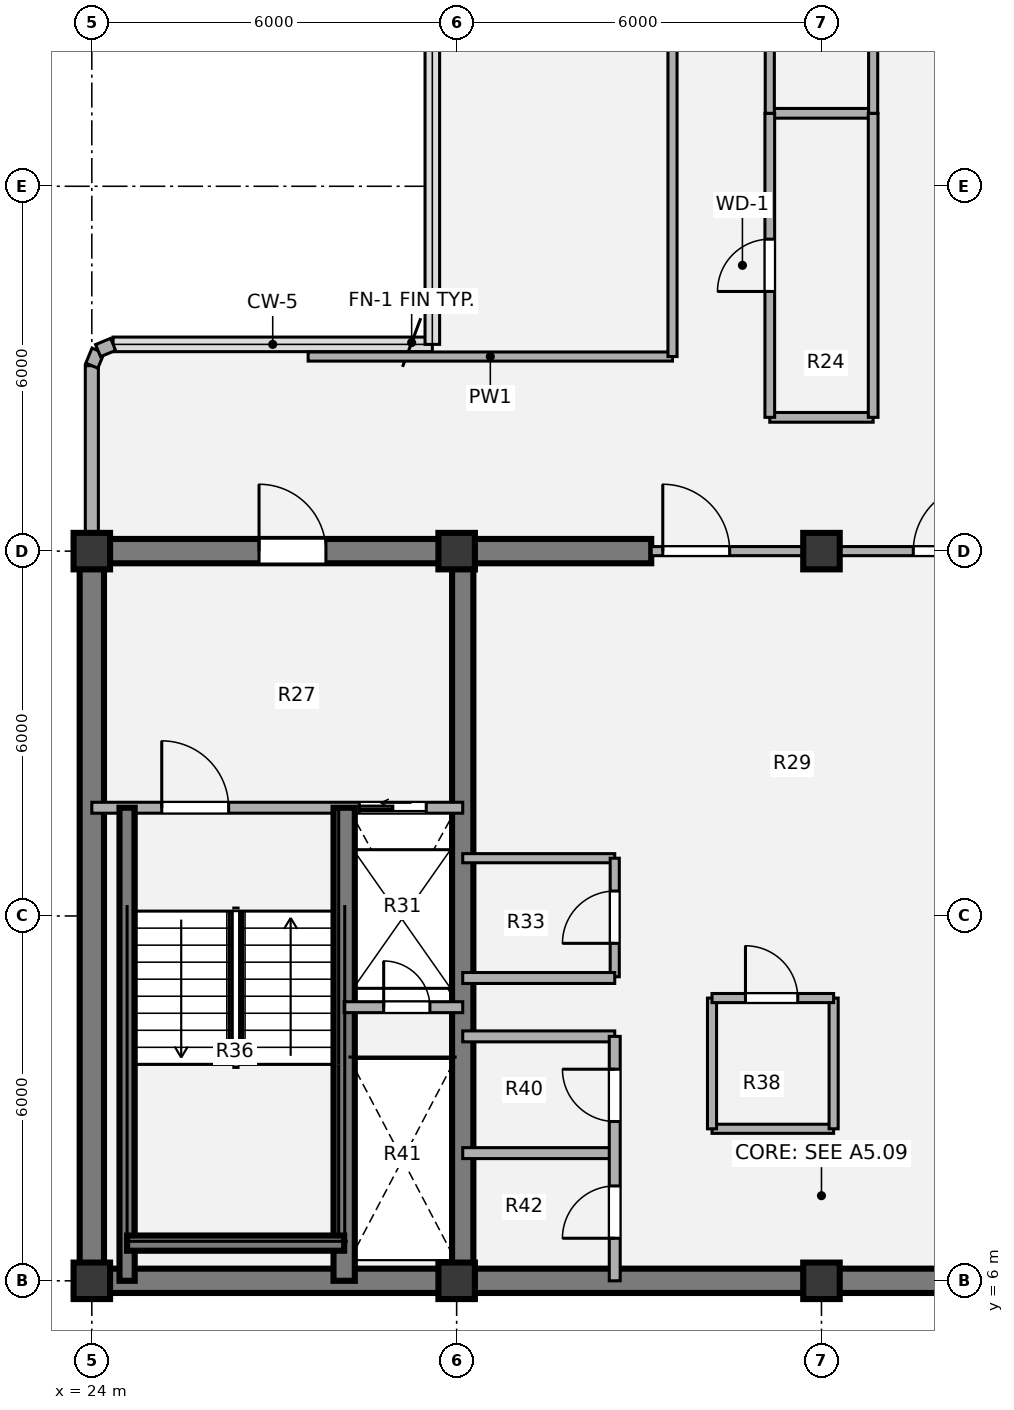
"""IFC4 building model, lengths in metres.
Left out: names, types, materials, properties, quantities, classifications, styles, units other than length and angle.
Written with IfcOpenShell. Run it as: python <this file> out.ifc"""

import sys

from ifc_helpers import new_model, si_unit, direction, frame, frame_2d, origin, origin_2d, place, context, subcontext, project, spatial, rectangle, extrude, source, transform, mapped, element, fill, save


model = new_model("IFC4")
c1 = context("Model", 3, precision=1e-05, world=origin(), true_north=direction((0.0, 1.0)))
c2 = subcontext(c1, "Body", "Model", "MODEL_VIEW")
j1 = project(units=[si_unit("LENGTHUNIT", "METRE"), si_unit("PLANEANGLEUNIT", "RADIAN")], contexts=[c1])
p1 = place(None, origin())
s1 = spatial("IfcSite", under=j1, at=p1, CompositionType="ELEMENT")
p2 = place(p1, origin())
s2 = spatial("IfcBuilding", under=s1, at=p2, CompositionType="ELEMENT")
p3 = place(p2, frame((0.0, 0.0, 223.02)))
s3 = spatial("IfcBuildingStorey", under=s2, at=p3, CompositionType="ELEMENT", Elevation=223.02)
m1 = source(origin(), c2, "Body", "SweptSolid", [
    extrude(rectangle(XDim=0.6, YDim=0.6, at=origin_2d()), origin(), (0.0, 0.0, 1.0), 3.78),
])
for number, where, z_axis, x_axis in (
    (1, (24.0, 6.0, 0.0), (0.0, 0.0, 1.0), (1.0, 0.0, 0.0)),
    (2, (30.0, 6.0, 0.0), (0.0, 0.0, 1.0), (1.0, 0.0, 0.0)),
    (3, (36.0, 6.0, 0.0), (0.0, 0.0, 1.0), (1.0, 0.0, 0.0)),
    (4, (24.0, 18.0, 0.0), (0.0, 0.0, 1.0), (1.0, 0.0, 0.0)),
    (5, (30.0, 18.0, 0.0), (0.0, 0.0, 1.0), (1.0, 0.0, 0.0)),
    (6, (36.0, 18.0, 0.0), (0.0, 0.0, 1.0), (1.0, 0.0, 0.0)),
):
    element("IfcColumn", number, at=place(p3, frame(where, z_axis=z_axis, x_axis=x_axis)), inside=s3, PredefinedType="COLUMN", context=c2, shape_type="MappedRepresentation", body=[
        mapped(m1, transform((0.0, 0.0, 0.0), x_axis=(1.0, 0.0, 0.0), y_axis=(0.0, 1.0, 0.0), z_axis=(0.0, 0.0, 1.0), scale=1.0)),
    ])
p4 = place(p3, frame((48.2, 6.0, 0.0), z_axis=(0.0, 0.0, 1.0), x_axis=(-1.0, 0.0, 0.0)))
e7 = element("IfcWall", 7, at=p4, inside=s3, PredefinedType="SHEAR", context=c2, shape_type="SweptSolid", body=[
    extrude(rectangle(XDim=24.4, YDim=0.4, at=frame_2d((12.2, 0.0))), origin(), (0.0, 0.0, 1.0), 3.78),
])
p5 = place(p3, frame((24.0, 6.0, 0.0), z_axis=(0.0, 0.0, 1.0), x_axis=(0.0, 1.0, 0.0)))
e8 = element("IfcWall", 8, at=p5, inside=s3, PredefinedType="SHEAR", context=c2, shape_type="SweptSolid", body=[
    extrude(rectangle(XDim=12.0, YDim=0.4, at=frame_2d((6.0, 0.0))), origin(), (0.0, 0.0, 1.0), 3.78),
])
p6 = place(p3, frame((23.8, 18.0, 0.0), z_axis=(0.0, 0.0, 1.0), x_axis=(1.0, 0.0, 0.0)))
e9 = element("IfcWall", 9, at=p6, inside=s3, PredefinedType="SHEAR", context=c2, shape_type="SweptSolid", body=[
    extrude(rectangle(XDim=9.4, YDim=0.4, at=frame_2d((4.7, 0.0))), origin(), (0.0, 0.0, 1.0), 3.78),
])
p7 = place(p6, frame((2.95, 0.0, 0.0)))
e10 = element("IfcOpeningElement", 10, at=p7, cuts=e9, PredefinedType="OPENING", context=c2, shape_type="SweptSolid", body=[
    extrude(rectangle(XDim=1.1, YDim=2.1, at=origin_2d()), frame((0.55, 0.21, 1.05), z_axis=(0.0, -1.0, 0.0), x_axis=(1.0, 0.0, 0.0)), (0.0, 0.0, 1.0), 0.42),
])
p8 = place(p3, frame((30.1, 6.0, 0.0), z_axis=(0.0, 0.0, 1.0), x_axis=(0.0, 1.0, 0.0)))
e11 = element("IfcWall", 11, at=p8, inside=s3, PredefinedType="SHEAR", context=c2, shape_type="SweptSolid", body=[
    extrude(rectangle(XDim=12.0, YDim=0.35, at=frame_2d((6.0, 0.0))), origin(), (0.0, 0.0, 1.0), 3.78),
])
p9 = place(p3, frame((24.0, 18.28, 0.0), z_axis=(0.0, 0.0, 1.0), x_axis=(0.0, 1.0, 0.0)))
e12 = element("IfcWall", 12, at=p9, inside=s3, PredefinedType="SOLIDWALL", context=c2, shape_type="SweptSolid", body=[
    extrude(rectangle(XDim=2.77, YDim=0.215, at=frame_2d((1.385, 0.0))), origin(), (0.0, 0.0, 1.0), 2.718),
])
p10 = place(p3, frame((24.0, 21.05, 0.0), z_axis=(0.0, 0.0, 1.0), x_axis=(0.382673670509, 0.923883575944, 0.0)))
e13 = element("IfcWall", 13, at=p10, inside=s3, PredefinedType="SOLIDWALL", context=c2, shape_type="SweptSolid", body=[
    extrude(rectangle(XDim=0.268, YDim=0.215, at=frame_2d((0.134, 0.0))), origin(), (0.0, 0.0, 1.0), 3.53),
])
p11 = place(p3, frame((24.103, 21.298, 0.0), z_axis=(0.0, 0.0, 1.0), x_axis=(0.924205486139, 0.381895560841, 0.0)))
e14 = element("IfcWall", 14, at=p11, inside=s3, PredefinedType="SOLIDWALL", context=c2, shape_type="SweptSolid", body=[
    extrude(rectangle(XDim=0.268, YDim=0.215, at=frame_2d((0.134, 0.0))), origin(), (0.0, 0.0, 1.0), 3.53),
])
p12 = place(p3, frame((30.1, 12.95, 0.0), z_axis=(0.0, 0.0, 1.0), x_axis=(1.0, 0.0, 0.0)))
e15 = element("IfcWall", 15, at=p12, inside=s3, PredefinedType="PARTITIONING", context=c2, shape_type="SweptSolid", body=[
    extrude(rectangle(XDim=2.5, YDim=0.15, at=frame_2d((1.25, 0.0))), origin(), (0.0, 0.0, 1.0), 3.5),
])
p13 = place(p3, frame((32.6, 11.0, 0.0), z_axis=(0.0, 0.0, 1.0), x_axis=(0.0, 1.0, 0.0)))
e16 = element("IfcWall", 16, at=p13, inside=s3, PredefinedType="PARTITIONING", context=c2, shape_type="SweptSolid", body=[
    extrude(rectangle(XDim=1.95, YDim=0.15, at=frame_2d((0.975, 0.0))), origin(), (0.0, 0.0, 1.0), 3.5),
])
p14 = place(p13, frame((0.55, 0.0, 0.0)))
e17 = element("IfcOpeningElement", 17, at=p14, cuts=e16, PredefinedType="OPENING", context=c2, shape_type="SweptSolid", body=[
    extrude(rectangle(XDim=0.86, YDim=2.1, at=origin_2d()), frame((0.43, 0.085, 1.05), z_axis=(0.0, -1.0, 0.0), x_axis=(1.0, 0.0, 0.0)), (0.0, 0.0, 1.0), 0.17),
])
p15 = place(p3, frame((34.2, 8.5, 0.0), z_axis=(0.0, 0.0, 1.0), x_axis=(1.0, 0.0, 0.0)))
e18 = element("IfcWall", 18, at=p15, inside=s3, PredefinedType="PARTITIONING", context=c2, shape_type="SweptSolid", body=[
    extrude(rectangle(XDim=2.0, YDim=0.15, at=frame_2d((1.0, 0.0))), origin(), (0.0, 0.0, 1.0), 3.5),
])
p16 = place(p3, frame((34.2, 8.5, 0.0), z_axis=(0.0, 0.0, 1.0), x_axis=(0.0, 1.0, 0.0)))
e19 = element("IfcWall", 19, at=p16, inside=s3, PredefinedType="PARTITIONING", context=c2, shape_type="SweptSolid", body=[
    extrude(rectangle(XDim=2.15, YDim=0.15, at=frame_2d((1.075, 0.0))), origin(), (0.0, 0.0, 1.0), 3.5),
])
p17 = place(p3, frame((36.2, 8.5, 0.0), z_axis=(0.0, 0.0, 1.0), x_axis=(0.0, 1.0, 0.0)))
e20 = element("IfcWall", 20, at=p17, inside=s3, PredefinedType="PARTITIONING", context=c2, shape_type="SweptSolid", body=[
    extrude(rectangle(XDim=2.15, YDim=0.15, at=frame_2d((1.075, 0.0))), origin(), (0.0, 0.0, 1.0), 2.715),
])
p18 = place(p3, frame((34.2, 10.65, 0.0), z_axis=(0.0, 0.0, 1.0), x_axis=(1.0, 0.0, 0.0)))
e21 = element("IfcWall", 21, at=p18, inside=s3, PredefinedType="PARTITIONING", context=c2, shape_type="SweptSolid", body=[
    extrude(rectangle(XDim=2.0, YDim=0.15, at=frame_2d((1.0, 0.0))), origin(), (0.0, 0.0, 1.0), 3.5),
])
p19 = place(p18, frame((0.55, 0.0, 0.0)))
e22 = element("IfcOpeningElement", 22, at=p19, cuts=e21, PredefinedType="OPENING", context=c2, shape_type="SweptSolid", body=[
    extrude(rectangle(XDim=0.86, YDim=2.1, at=origin_2d()), frame((0.43, 0.085, 1.05), z_axis=(0.0, -1.0, 0.0), x_axis=(1.0, 0.0, 0.0)), (0.0, 0.0, 1.0), 0.17),
])
for number, where, z_axis, x_axis in (
    (23, (30.1, 10.98, 0.0), (0.0, 0.0, 1.0), (1.0, 0.0, 0.0)),
    (24, (30.1, 8.1, 0.0), (0.0, 0.0, 1.0), (1.0, 0.0, 0.0)),
    (25, (30.1, 10.02, 0.0), (0.0, 0.0, 1.0), (1.0, 0.0, 0.0)),
):
    element("IfcWall", number, at=place(p3, frame(where, z_axis=z_axis, x_axis=x_axis)), inside=s3, PredefinedType="PARTITIONING", context=c2, shape_type="SweptSolid", body=[
        extrude(rectangle(XDim=2.5, YDim=0.18, at=frame_2d((1.25, 0.0))), origin(), (0.0, 0.0, 1.0), 3.5),
    ])
p20 = place(p3, frame((32.6, 6.0, 0.0), z_axis=(0.0, 0.0, 1.0), x_axis=(0.0, 1.0, 0.0)))
e26 = element("IfcWall", 26, at=p20, inside=s3, PredefinedType="PARTITIONING", context=c2, shape_type="SweptSolid", body=[
    extrude(rectangle(XDim=4.02, YDim=0.18, at=frame_2d((2.01, 0.0))), origin(), (0.0, 0.0, 1.0), 3.5),
])
p21 = place(p20, frame((0.7, 0.0, 0.0)))
e27 = element("IfcOpeningElement", 27, at=p21, cuts=e26, PredefinedType="OPENING", context=c2, shape_type="SweptSolid", body=[
    extrude(rectangle(XDim=0.86, YDim=2.1, at=origin_2d()), frame((0.43, 0.1, 1.05), z_axis=(0.0, -1.0, 0.0), x_axis=(1.0, 0.0, 0.0)), (0.0, 0.0, 1.0), 0.2),
])
p22 = place(p20, frame((2.62, 0.0, 0.0)))
e28 = element("IfcOpeningElement", 28, at=p22, cuts=e26, PredefinedType="OPENING", context=c2, shape_type="SweptSolid", body=[
    extrude(rectangle(XDim=0.86, YDim=2.1, at=origin_2d()), frame((0.43, 0.1, 1.05), z_axis=(0.0, -1.0, 0.0), x_axis=(1.0, 0.0, 0.0)), (0.0, 0.0, 1.0), 0.2),
])
p23 = place(p3, frame((33.2, 18.0, 0.0), z_axis=(0.0, 0.0, 1.0), x_axis=(1.0, 0.0, 0.0)))
e29 = element("IfcWall", 29, at=p23, inside=s3, PredefinedType="PARTITIONING", context=c2, shape_type="SweptSolid", body=[
    extrude(rectangle(XDim=5.6, YDim=0.15, at=frame_2d((2.8, 0.0))), origin(), (0.0, 0.0, 1.0), 2.515),
])
p24 = place(p23, frame((0.19, 0.0, 0.0)))
e30 = element("IfcOpeningElement", 30, at=p24, cuts=e29, PredefinedType="OPENING", context=c2, shape_type="SweptSolid", body=[
    extrude(rectangle(XDim=1.1, YDim=2.1, at=origin_2d()), frame((0.55, 0.085, 1.05), z_axis=(0.0, -1.0, 0.0), x_axis=(1.0, 0.0, 0.0)), (0.0, 0.0, 1.0), 0.17),
])
p25 = place(p23, frame((4.31, 0.0, 0.0)))
e31 = element("IfcOpeningElement", 31, at=p25, cuts=e29, PredefinedType="OPENING", context=c2, shape_type="SweptSolid", body=[
    extrude(rectangle(XDim=1.1, YDim=2.1, at=origin_2d()), frame((0.55, 0.085, 1.05), z_axis=(0.0, -1.0, 0.0), x_axis=(1.0, 0.0, 0.0)), (0.0, 0.0, 1.0), 0.17),
])
p26 = place(p3, frame((24.0, 13.78, 0.0), z_axis=(0.0, 0.0, 1.0), x_axis=(1.0, 0.0, 0.0)))
e32 = element("IfcWall", 32, at=p26, inside=s3, PredefinedType="PARTITIONING", context=c2, shape_type="SweptSolid", body=[
    extrude(rectangle(XDim=6.1, YDim=0.18, at=frame_2d((3.05, 0.0))), origin(), (0.0, 0.0, 1.0), 3.5),
])
p27 = place(p26, frame((1.15, 0.0, 0.0)))
e33 = element("IfcOpeningElement", 33, at=p27, cuts=e32, PredefinedType="OPENING", context=c2, shape_type="SweptSolid", body=[
    extrude(rectangle(XDim=1.1, YDim=2.1, at=origin_2d()), frame((0.55, 0.1, 1.05), z_axis=(0.0, -1.0, 0.0), x_axis=(1.0, 0.0, 0.0)), (0.0, 0.0, 1.0), 0.2),
])
p28 = place(p26, frame((4.4, 0.0, 0.0)))
e34 = element("IfcOpeningElement", 34, at=p28, cuts=e32, PredefinedType="OPENING", context=c2, shape_type="SweptSolid", body=[
    extrude(rectangle(XDim=1.1, YDim=2.1, at=origin_2d()), frame((0.55, 0.1, 1.05), z_axis=(0.0, -1.0, 0.0), x_axis=(1.0, 0.0, 0.0)), (0.0, 0.0, 1.0), 0.2),
])
p29 = place(p3, frame((28.15, 6.0, 0.0), z_axis=(0.0, 0.0, 1.0), x_axis=(0.0, 1.0, 0.0)))
e35 = element("IfcWall", 35, at=p29, inside=s3, PredefinedType="SHEAR", context=c2, shape_type="SweptSolid", body=[
    extrude(rectangle(XDim=7.78, YDim=0.35, at=frame_2d((3.89, 0.0))), origin(), (0.0, 0.0, 1.0), 3.85),
])
p30 = place(p3, frame((24.58, 6.0, 0.0), z_axis=(0.0, 0.0, 1.0), x_axis=(0.0, 1.0, 0.0)))
e36 = element("IfcWall", 36, at=p30, inside=s3, PredefinedType="SHEAR", context=c2, shape_type="SweptSolid", body=[
    extrude(rectangle(XDim=7.78, YDim=0.25, at=frame_2d((3.89, 0.0))), origin(), (0.0, 0.0, 1.0), 3.85),
])
p31 = place(p3, frame((24.58, 6.62, 0.0), z_axis=(0.0, 0.0, 1.0), x_axis=(1.0, 0.0, 0.0)))
e37 = element("IfcWall", 37, at=p31, inside=s3, PredefinedType="SHEAR", context=c2, shape_type="SweptSolid", body=[
    extrude(rectangle(XDim=3.57, YDim=0.25, at=frame_2d((1.785, 0.0))), origin(), (0.0, 0.0, 1.0), 3.85),
])
p32 = place(p3, frame((28.15, 10.5, 0.0), z_axis=(0.0, 0.0, 1.0), x_axis=(1.0, 0.0, 0.0)))
e38 = element("IfcWall", 38, at=p32, inside=s3, PredefinedType="PARTITIONING", context=c2, shape_type="SweptSolid", body=[
    extrude(rectangle(XDim=1.95, YDim=0.18, at=frame_2d((0.975, 0.0))), origin(), (0.0, 0.0, 1.0), 3.5),
])
p33 = place(p32, frame((0.65, 0.0, 0.0)))
e39 = element("IfcOpeningElement", 39, at=p33, cuts=e38, PredefinedType="OPENING", context=c2, shape_type="SweptSolid", body=[
    extrude(rectangle(XDim=0.76, YDim=2.05, at=origin_2d()), frame((0.38, 0.1, 1.025), z_axis=(0.0, -1.0, 0.0), x_axis=(1.0, 0.0, 0.0)), (0.0, 0.0, 1.0), 0.2),
])
p34 = place(p3, frame((35.15, 20.2, 0.0), z_axis=(0.0, 0.0, 1.0), x_axis=(1.0, 0.0, 0.0)))
e40 = element("IfcWall", 40, at=p34, inside=s3, PredefinedType="PLUMBINGWALL", context=c2, shape_type="SweptSolid", body=[
    extrude(rectangle(XDim=1.7, YDim=0.16, at=frame_2d((0.85, 0.0))), origin(), (0.0, 0.0, 1.0), 3.5),
])
p35 = place(p3, frame((27.558, 21.2, 0.0), z_axis=(0.0, 0.0, 1.0), x_axis=(1.0, 0.0, 0.0)))
e41 = element("IfcWall", 41, at=p35, inside=s3, PredefinedType="PARTITIONING", context=c2, shape_type="SweptSolid", body=[
    extrude(rectangle(XDim=5.992, YDim=0.15, at=frame_2d((2.996, 0.0))), origin(), (0.0, 0.0, 1.0), 3.5),
])
p36 = place(p3, frame((35.15, 25.2, 0.0), z_axis=(0.0, 0.0, 1.0), x_axis=(1.0, 0.0, 0.0)))
e42 = element("IfcWall", 42, at=p36, inside=s3, PredefinedType="PLUMBINGWALL", context=c2, shape_type="SweptSolid", body=[
    extrude(rectangle(XDim=1.7, YDim=0.16, at=frame_2d((0.85, 0.0))), origin(), (0.0, 0.0, 1.0), 3.5),
])
p37 = place(p3, frame((33.55, 21.2, 0.0), z_axis=(0.0, 0.0, 1.0), x_axis=(0.0, 1.0, 0.0)))
e43 = element("IfcWall", 43, at=p37, inside=s3, PredefinedType="PARTITIONING", context=c2, shape_type="SweptSolid", body=[
    extrude(rectangle(XDim=20.4, YDim=0.15, at=frame_2d((10.2, 0.0))), origin(), (0.0, 0.0, 1.0), 3.5),
])
p38 = place(p37, frame((9.64, 0.0, 0.0)))
e44 = element("IfcOpeningElement", 44, at=p38, cuts=e43, PredefinedType="OPENING", context=c2, shape_type="SweptSolid", body=[
    extrude(rectangle(XDim=0.86, YDim=2.1, at=origin_2d()), frame((0.43, 0.085, 1.05), z_axis=(0.0, -1.0, 0.0), x_axis=(1.0, 0.0, 0.0)), (0.0, 0.0, 1.0), 0.17),
])
p39 = place(p3, frame((35.15, 20.2, 0.0), z_axis=(0.0, 0.0, 1.0), x_axis=(0.0, 1.0, 0.0)))
e45 = element("IfcWall", 45, at=p39, inside=s3, PredefinedType="PLUMBINGWALL", context=c2, shape_type="SweptSolid", body=[
    extrude(rectangle(XDim=5.0, YDim=0.16, at=frame_2d((2.5, 0.0))), origin(), (0.0, 0.0, 1.0), 3.5),
])
p40 = place(p39, frame((2.07, 0.0, 0.0)))
e46 = element("IfcOpeningElement", 46, at=p40, cuts=e45, PredefinedType="OPENING", context=c2, shape_type="SweptSolid", body=[
    extrude(rectangle(XDim=0.86, YDim=2.1, at=origin_2d()), frame((0.43, 0.09, 1.05), z_axis=(0.0, -1.0, 0.0), x_axis=(1.0, 0.0, 0.0)), (0.0, 0.0, 1.0), 0.18),
])
p41 = place(p3, frame((35.15, 25.2, 0.0), z_axis=(0.0, 0.0, 1.0), x_axis=(0.0, 1.0, 0.0)))
e47 = element("IfcWall", 47, at=p41, inside=s3, PredefinedType="PARTITIONING", context=c2, shape_type="SweptSolid", body=[
    extrude(rectangle(XDim=19.42, YDim=0.15, at=frame_2d((9.71, 0.0))), origin(), (0.0, 0.0, 1.0), 3.5),
])
p42 = place(p3, frame((36.85, 20.2, 0.0), z_axis=(0.0, 0.0, 1.0), x_axis=(0.0, 1.0, 0.0)))
e48 = element("IfcWall", 48, at=p42, inside=s3, PredefinedType="PLUMBINGWALL", context=c2, shape_type="SweptSolid", body=[
    extrude(rectangle(XDim=5.0, YDim=0.16, at=frame_2d((2.5, 0.0))), origin(), (0.0, 0.0, 1.0), 3.5),
])
p43 = place(p3, frame((36.85, 25.2, 0.0), z_axis=(0.0, 0.0, 1.0), x_axis=(0.0, 1.0, 0.0)))
e49 = element("IfcWall", 49, at=p43, inside=s3, PredefinedType="PARTITIONING", context=c2, shape_type="SweptSolid", body=[
    extrude(rectangle(XDim=19.42, YDim=0.15, at=frame_2d((9.71, 0.0))), origin(), (0.0, 0.0, 1.0), 3.5),
])
p44 = place(p43, frame((9.185, 0.0, 0.0)))
e50 = element("IfcOpeningElement", 50, at=p44, cuts=e49, PredefinedType="OPENING", context=c2, shape_type="SweptSolid", body=[
    extrude(rectangle(XDim=1.05, YDim=2.1, at=origin_2d()), frame((0.525, 0.085, 1.05), z_axis=(0.0, -1.0, 0.0), x_axis=(1.0, 0.0, 0.0)), (0.0, 0.0, 1.0), 0.17),
])
m2 = source(origin(), c2, "Body", "SweptSolid", [
    extrude(rectangle(XDim=0.86, YDim=2.1, at=origin_2d()), frame((0.43, 0.025, 1.05), z_axis=(0.0, -1.0, 0.0), x_axis=(1.0, 0.0, 0.0)), (0.0, 0.0, 1.0), 0.05),
])
p45 = place(p14, origin())
e51 = element("IfcDoor", 51, at=p45, inside=s3, OperationType="SINGLE_SWING_LEFT", PredefinedType="DOOR", context=c2, shape_type="MappedRepresentation", body=[
    mapped(m2, transform((0.0, 0.0, 0.0), x_axis=(1.0, 0.0, 0.0), y_axis=(0.0, 1.0, 0.0), z_axis=(0.0, 0.0, 1.0), scale=1.0)),
])
fill(e17, e51)
p46 = place(p19, origin())
e52 = element("IfcDoor", 52, at=p46, inside=s3, OperationType="SINGLE_SWING_LEFT", PredefinedType="DOOR", context=c2, shape_type="MappedRepresentation", body=[
    mapped(m2, transform((0.0, 0.0, 0.0), x_axis=(1.0, 0.0, 0.0), y_axis=(0.0, 1.0, 0.0), z_axis=(0.0, 0.0, 1.0), scale=1.0)),
])
fill(e22, e52)
p47 = place(p21, origin())
e53 = element("IfcDoor", 53, at=p47, inside=s3, OperationType="SINGLE_SWING_LEFT", PredefinedType="DOOR", context=c2, shape_type="MappedRepresentation", body=[
    mapped(m2, transform((0.0, 0.0, 0.0), x_axis=(1.0, 0.0, 0.0), y_axis=(0.0, 1.0, 0.0), z_axis=(0.0, 0.0, 1.0), scale=1.0)),
])
fill(e27, e53)
p48 = place(p22, origin())
e54 = element("IfcDoor", 54, at=p48, inside=s3, OperationType="SINGLE_SWING_RIGHT", PredefinedType="DOOR", context=c2, shape_type="MappedRepresentation", body=[
    mapped(m2, transform((0.0, 0.0, 0.0), x_axis=(1.0, 0.0, 0.0), y_axis=(0.0, 1.0, 0.0), z_axis=(0.0, 0.0, 1.0), scale=1.0)),
])
fill(e28, e54)
m3 = source(origin(), c2, "Body", "SweptSolid", [
    extrude(rectangle(XDim=1.1, YDim=2.1, at=origin_2d()), frame((0.55, 0.025, 1.05), z_axis=(0.0, -1.0, 0.0), x_axis=(1.0, 0.0, 0.0)), (0.0, 0.0, 1.0), 0.05),
])
p49 = place(p24, origin())
e55 = element("IfcDoor", 55, at=p49, inside=s3, OperationType="SINGLE_SWING_LEFT", PredefinedType="DOOR", context=c2, shape_type="MappedRepresentation", body=[
    mapped(m3, transform((0.0, 0.0, 0.0), x_axis=(1.0, 0.0, 0.0), y_axis=(0.0, 1.0, 0.0), z_axis=(0.0, 0.0, 1.0), scale=1.0)),
])
fill(e30, e55)
p50 = place(p25, origin())
e56 = element("IfcDoor", 56, at=p50, inside=s3, OperationType="SINGLE_SWING_RIGHT", PredefinedType="DOOR", context=c2, shape_type="MappedRepresentation", body=[
    mapped(m3, transform((0.0, 0.0, 0.0), x_axis=(1.0, 0.0, 0.0), y_axis=(0.0, 1.0, 0.0), z_axis=(0.0, 0.0, 1.0), scale=1.0)),
])
fill(e31, e56)
m4 = source(origin(), c2, "Body", "SweptSolid", [
    extrude(rectangle(XDim=1.1, YDim=2.1, at=origin_2d()), frame((0.55, 0.025, 1.05), z_axis=(0.0, -1.0, 0.0), x_axis=(1.0, 0.0, 0.0)), (0.0, 0.0, 1.0), 0.05),
])
p51 = place(p27, origin())
e57 = element("IfcDoor", 57, at=p51, inside=s3, OperationType="SINGLE_SWING_LEFT", PredefinedType="DOOR", context=c2, shape_type="MappedRepresentation", body=[
    mapped(m4, transform((0.0, 0.0, 0.0), x_axis=(1.0, 0.0, 0.0), y_axis=(0.0, 1.0, 0.0), z_axis=(0.0, 0.0, 1.0), scale=1.0)),
])
fill(e33, e57)
m5 = source(origin(), c2, "Body", "SweptSolid", [
    extrude(rectangle(XDim=1.1, YDim=2.1, at=origin_2d()), frame((0.55, 0.025, 1.05), z_axis=(0.0, -1.0, 0.0), x_axis=(1.0, 0.0, 0.0)), (0.0, 0.0, 1.0), 0.05),
])
p52 = place(p28, origin())
e58 = element("IfcDoor", 58, at=p52, inside=s3, OperationType="SLIDING_TO_LEFT", PredefinedType="DOOR", context=c2, shape_type="MappedRepresentation", body=[
    mapped(m5, transform((0.0, 0.0, 0.0), x_axis=(1.0, 0.0, 0.0), y_axis=(0.0, 1.0, 0.0), z_axis=(0.0, 0.0, 1.0), scale=1.0)),
])
fill(e34, e58)
m6 = source(origin(), c2, "Body", "SweptSolid", [
    extrude(rectangle(XDim=0.76, YDim=2.05, at=origin_2d()), frame((0.38, 0.025, 1.025), z_axis=(0.0, -1.0, 0.0), x_axis=(1.0, 0.0, 0.0)), (0.0, 0.0, 1.0), 0.05),
])
p53 = place(p33, origin())
e59 = element("IfcDoor", 59, at=p53, inside=s3, OperationType="SINGLE_SWING_LEFT", PredefinedType="DOOR", context=c2, shape_type="MappedRepresentation", body=[
    mapped(m6, transform((0.0, 0.0, 0.0), x_axis=(1.0, 0.0, 0.0), y_axis=(0.0, 1.0, 0.0), z_axis=(0.0, 0.0, 1.0), scale=1.0)),
])
fill(e39, e59)
p54 = place(p7, origin())
e60 = element("IfcDoor", 60, at=p54, inside=s3, OperationType="SINGLE_SWING_LEFT", PredefinedType="DOOR", context=c2, shape_type="MappedRepresentation", body=[
    mapped(m3, transform((0.0, 0.0, 0.0), x_axis=(1.0, 0.0, 0.0), y_axis=(0.0, 1.0, 0.0), z_axis=(0.0, 0.0, 1.0), scale=1.0)),
])
fill(e10, e60)
m7 = source(origin(), c2, "Body", "SweptSolid", [
    extrude(rectangle(XDim=0.86, YDim=2.1, at=origin_2d()), frame((0.43, 0.025, 1.05), z_axis=(0.0, -1.0, 0.0), x_axis=(1.0, 0.0, 0.0)), (0.0, 0.0, 1.0), 0.05),
])
p55 = place(p40, origin())
e61 = element("IfcDoor", 61, at=p55, inside=s3, OperationType="SINGLE_SWING_LEFT", PredefinedType="DOOR", context=c2, shape_type="MappedRepresentation", body=[
    mapped(m7, transform((0.0, 0.0, 0.0), x_axis=(1.0, 0.0, 0.0), y_axis=(0.0, 1.0, 0.0), z_axis=(0.0, 0.0, 1.0), scale=1.0)),
])
fill(e46, e61)
save(model, sys.argv[1])
